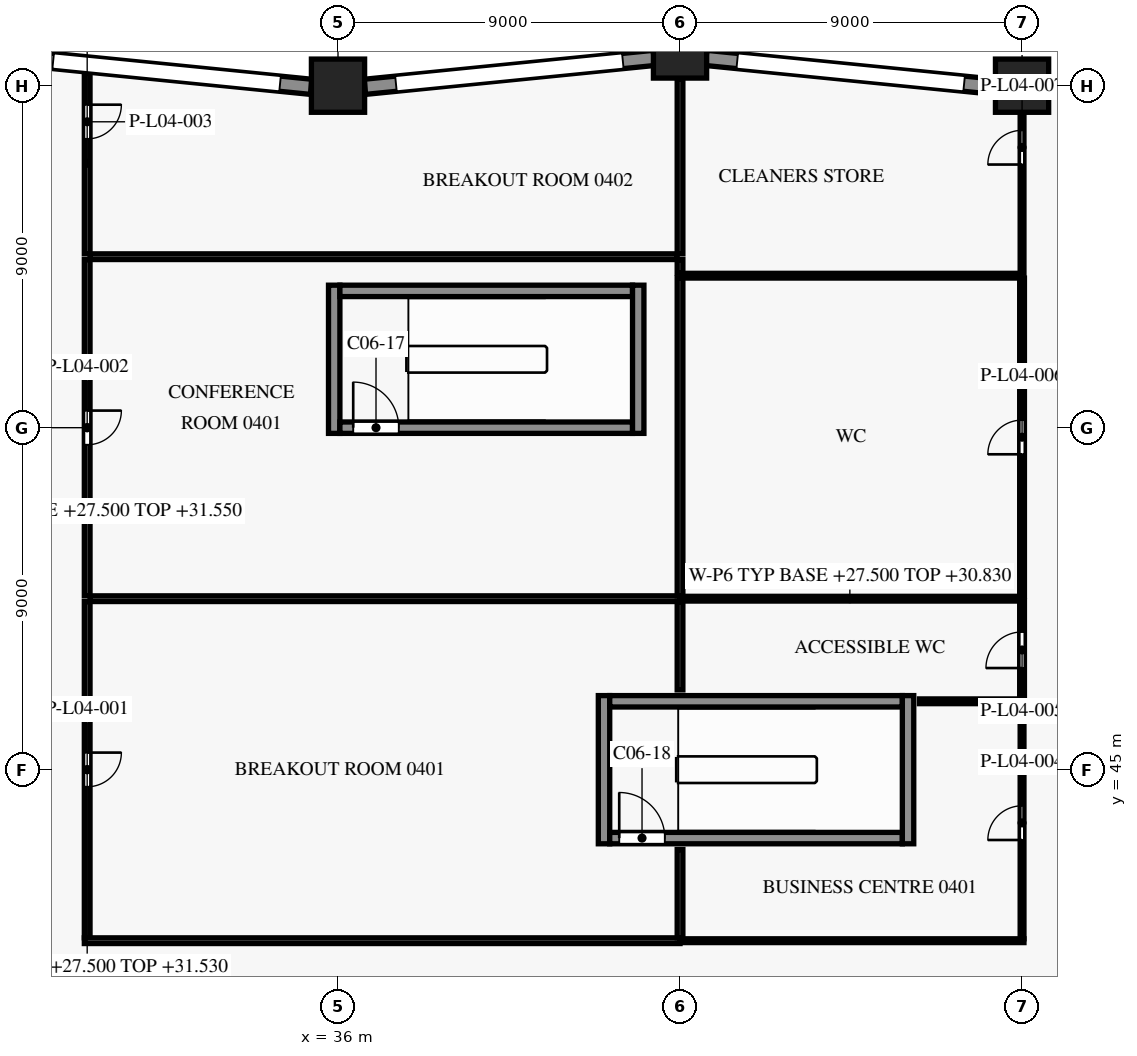
"""IFC4 building model, lengths in metres.
Left out: names, types, materials, properties, quantities, classifications, styles, units other than length and angle.
Written with IfcOpenShell. Run it as: python <this file> out.ifc"""

import sys

from ifc_helpers import new_model, si_unit, direction, frame, frame_2d, origin, origin_2d, place, context, subcontext, project, spatial, rectangle, extrude, element, fill, save


model = new_model("IFC4")
c1 = context("Model", 3, precision=1e-05, world=origin(), true_north=direction((0.0, 1.0)))
c2 = subcontext(c1, "Body", "Model", "MODEL_VIEW")
j1 = project(units=[si_unit("LENGTHUNIT", "METRE"), si_unit("PLANEANGLEUNIT", "RADIAN")], contexts=[c1])
p1 = place(None, origin())
s1 = spatial("IfcSite", under=j1, at=p1, CompositionType="ELEMENT")
p2 = place(p1, origin())
s2 = spatial("IfcBuilding", under=s1, at=p2, CompositionType="ELEMENT")
p3 = place(p2, frame((0.0, 0.0, 27.5)))
s3 = spatial("IfcBuildingStorey", under=s2, at=p3, CompositionType="ELEMENT", Elevation=27.5)
for number, where, z_axis, x_axis in (
    (1, (54.0, 63.0, 0.0), (0.0, 0.0, 1.0), (1.0, 0.0, 0.0)),
    (2, (45.0, 63.9, 0.0), (0.0, 0.0, 1.0), (1.0, 0.0, 0.0)),
    (3, (36.0, 63.0, 0.0), (0.0, 0.0, 1.0), (1.0, 0.0, 0.0)),
):
    element("IfcColumn", number, at=place(p3, frame(where, z_axis=z_axis, x_axis=x_axis)), inside=s3, PredefinedType="COLUMN", context=c2, shape_type="SweptSolid", body=[
        extrude(rectangle(XDim=1.4, YDim=1.4, at=origin_2d()), origin(), (0.0, 0.0, 1.0), 4.5),
    ])
p4 = place(p3, frame((54.707, 62.97, 0.0), z_axis=(0.0, 0.0, 1.0), x_axis=(0.995039719416, 0.099478423711, 0.0)))
e4 = element("IfcWall", 4, at=p4, inside=s3, PredefinedType="SOLIDWALL", context=c2, shape_type="SweptSolid", body=[
    extrude(rectangle(XDim=7.645, YDim=0.4, at=frame_2d((3.822, 0.0))), origin(), (0.0, 0.0, 1.0), 3.6),
])
p5 = place(p4, frame((0.823, 0.0, 0.9)))
e5 = element("IfcOpeningElement", 5, at=p5, cuts=e4, PredefinedType="OPENING", context=c2, shape_type="SweptSolid", body=[
    extrude(rectangle(XDim=6.0, YDim=1.8, at=frame_2d((3.0, 0.9))), frame((0.0, 0.21, 0.0), z_axis=(0.0, -1.0, 0.0), x_axis=(1.0, 0.0, 0.0)), (0.0, 0.0, 1.0), 0.42),
])
p6 = place(p3, frame((45.687, 63.731, 0.0), z_axis=(0.0, 0.0, 1.0), x_axis=(0.995039719416, -0.099478423711, 0.0)))
e6 = element("IfcWall", 6, at=p6, inside=s3, PredefinedType="SOLIDWALL", context=c2, shape_type="SweptSolid", body=[
    extrude(rectangle(XDim=7.645, YDim=0.4, at=frame_2d((3.822, 0.0))), origin(), (0.0, 0.0, 1.0), 3.6),
])
p7 = place(p6, frame((0.823, 0.0, 0.9)))
e7 = element("IfcOpeningElement", 7, at=p7, cuts=e6, PredefinedType="OPENING", context=c2, shape_type="SweptSolid", body=[
    extrude(rectangle(XDim=6.0, YDim=1.8, at=frame_2d((3.0, 0.9))), frame((0.0, 0.21, 0.0), z_axis=(0.0, -1.0, 0.0), x_axis=(1.0, 0.0, 0.0)), (0.0, 0.0, 1.0), 0.42),
])
p8 = place(p3, frame((36.707, 62.97, 0.0), z_axis=(0.0, 0.0, 1.0), x_axis=(0.995039719416, 0.099478423711, 0.0)))
e8 = element("IfcWall", 8, at=p8, inside=s3, PredefinedType="SOLIDWALL", context=c2, shape_type="SweptSolid", body=[
    extrude(rectangle(XDim=7.645, YDim=0.4, at=frame_2d((3.822, 0.0))), origin(), (0.0, 0.0, 1.0), 3.6),
])
p9 = place(p8, frame((0.823, 0.0, 0.9)))
e9 = element("IfcOpeningElement", 9, at=p9, cuts=e8, PredefinedType="OPENING", context=c2, shape_type="SweptSolid", body=[
    extrude(rectangle(XDim=6.0, YDim=1.8, at=frame_2d((3.0, 0.9))), frame((0.0, 0.21, 0.0), z_axis=(0.0, -1.0, 0.0), x_axis=(1.0, 0.0, 0.0)), (0.0, 0.0, 1.0), 0.42),
])
p10 = place(p3, frame((27.687, 63.731, 0.0), z_axis=(0.0, 0.0, 1.0), x_axis=(0.995039719416, -0.099478423711, 0.0)))
e10 = element("IfcWall", 10, at=p10, inside=s3, PredefinedType="SOLIDWALL", context=c2, shape_type="SweptSolid", body=[
    extrude(rectangle(XDim=7.645, YDim=0.4, at=frame_2d((3.822, 0.0))), origin(), (0.0, 0.0, 1.0), 3.6),
])
p11 = place(p10, frame((0.823, 0.0, 0.9)))
e11 = element("IfcOpeningElement", 11, at=p11, cuts=e10, PredefinedType="OPENING", context=c2, shape_type="SweptSolid", body=[
    extrude(rectangle(XDim=6.0, YDim=1.8, at=frame_2d((3.0, 0.9))), frame((0.0, 0.21, 0.0), z_axis=(0.0, -1.0, 0.0), x_axis=(1.0, 0.0, 0.0)), (0.0, 0.0, 1.0), 0.42),
])
p12 = place(p3, frame((43.15, 43.2, 0.0), z_axis=(0.0, 0.0, 1.0), x_axis=(1.0, 0.0, 0.0)))
e12 = element("IfcWall", 12, at=p12, inside=s3, PredefinedType="SHEAR", context=c2, shape_type="SweptSolid", body=[
    extrude(rectangle(XDim=7.7, YDim=0.3, at=frame_2d((3.85, 0.0))), origin(), (0.0, 0.0, 1.0), 4.2),
])
p13 = place(p12, frame((0.25, 0.0, 0.0)))
e13 = element("IfcOpeningElement", 13, at=p13, cuts=e12, PredefinedType="OPENING", context=c2, shape_type="SweptSolid", body=[
    extrude(rectangle(XDim=1.2, YDim=2.2, at=frame_2d((0.6, 1.1))), frame((0.0, 0.16, 0.0), z_axis=(0.0, -1.0, 0.0), x_axis=(1.0, 0.0, 0.0)), (0.0, 0.0, 1.0), 0.32),
])
p14 = place(p3, frame((43.15, 46.8, 0.0), z_axis=(0.0, 0.0, 1.0), x_axis=(1.0, 0.0, 0.0)))
e14 = element("IfcWall", 14, at=p14, inside=s3, PredefinedType="SHEAR", context=c2, shape_type="SweptSolid", body=[
    extrude(rectangle(XDim=7.7, YDim=0.3, at=frame_2d((3.85, 0.0))), origin(), (0.0, 0.0, 1.0), 4.2),
])
p15 = place(p3, frame((36.05, 54.0, 0.0), z_axis=(0.0, 0.0, 1.0), x_axis=(1.0, 0.0, 0.0)))
e15 = element("IfcWall", 15, at=p15, inside=s3, PredefinedType="SHEAR", context=c2, shape_type="SweptSolid", body=[
    extrude(rectangle(XDim=7.7, YDim=0.3, at=frame_2d((3.85, 0.0))), origin(), (0.0, 0.0, 1.0), 4.2),
])
p16 = place(p15, frame((0.35, 0.0, 0.0)))
e16 = element("IfcOpeningElement", 16, at=p16, cuts=e15, PredefinedType="OPENING", context=c2, shape_type="SweptSolid", body=[
    extrude(rectangle(XDim=1.2, YDim=2.2, at=frame_2d((0.6, 1.1))), frame((0.0, 0.16, 0.0), z_axis=(0.0, -1.0, 0.0), x_axis=(1.0, 0.0, 0.0)), (0.0, 0.0, 1.0), 0.32),
])
p17 = place(p3, frame((36.05, 57.6, 0.0), z_axis=(0.0, 0.0, 1.0), x_axis=(1.0, 0.0, 0.0)))
e17 = element("IfcWall", 17, at=p17, inside=s3, PredefinedType="SHEAR", context=c2, shape_type="SweptSolid", body=[
    extrude(rectangle(XDim=7.7, YDim=0.3, at=frame_2d((3.85, 0.0))), origin(), (0.0, 0.0, 1.0), 4.2),
])
for number, where, z_axis, x_axis in (
    (18, (35.9, 53.85, 0.0), (0.0, 0.0, 1.0), (0.0, 1.0, 0.0)),
    (19, (43.0, 43.05, 0.0), (0.0, 0.0, 1.0), (0.0, 1.0, 0.0)),
    (20, (43.9, 53.85, 0.0), (0.0, 0.0, 1.0), (0.0, 1.0, 0.0)),
    (21, (51.0, 43.05, 0.0), (0.0, 0.0, 1.0), (0.0, 1.0, 0.0)),
):
    element("IfcWall", number, at=place(p3, frame(where, z_axis=z_axis, x_axis=x_axis)), inside=s3, PredefinedType="SHEAR", context=c2, shape_type="SweptSolid", body=[
        extrude(rectangle(XDim=3.9, YDim=0.3, at=frame_2d((1.95, 0.0))), origin(), (0.0, 0.0, 1.0), 4.2),
    ])
p18 = place(p3, frame((29.325, 40.5, 0.0), z_axis=(0.0, 0.0, 1.0), x_axis=(1.0, 0.0, 0.0)))
e22 = element("IfcWall", 22, at=p18, inside=s3, PredefinedType="PARTITIONING", context=c2, shape_type="SweptSolid", body=[
    extrude(rectangle(XDim=15.675, YDim=0.15, at=frame_2d((7.837, 0.0))), origin(), (0.0, 0.0, 1.0), 3.33),
])
p19 = place(p3, frame((45.0, 40.5, 0.0), z_axis=(0.0, 0.0, 1.0), x_axis=(1.0, 0.0, 0.0)))
e23 = element("IfcWall", 23, at=p19, inside=s3, PredefinedType="PARTITIONING", context=c2, shape_type="SweptSolid", body=[
    extrude(rectangle(XDim=9.05, YDim=0.1, at=frame_2d((4.525, 0.0))), origin(), (0.0, 0.0, 1.0), 3.33),
])
p20 = place(p3, frame((54.0, 40.55, 0.0), z_axis=(0.0, 0.0, 1.0), x_axis=(0.0, 1.0, 0.0)))
e24 = element("IfcWall", 24, at=p20, inside=s3, PredefinedType="PARTITIONING", context=c2, shape_type="SweptSolid", body=[
    extrude(rectangle(XDim=6.188, YDim=0.1, at=frame_2d((3.094, 0.0))), origin(), (0.0, 0.0, 1.0), 3.33),
])
p21 = place(p20, frame((2.6, 0.0, 0.0)))
e25 = element("IfcOpeningElement", 25, at=p21, cuts=e24, PredefinedType="OPENING", context=c2, shape_type="SweptSolid", body=[
    extrude(rectangle(XDim=0.9, YDim=2.1, at=frame_2d((0.45, 1.05))), frame((0.0, 0.06, 0.0), z_axis=(0.0, -1.0, 0.0), x_axis=(1.0, 0.0, 0.0)), (0.0, 0.0, 1.0), 0.12),
])
p22 = place(p3, frame((45.0, 42.9, 0.0), z_axis=(0.0, 0.0, 1.0), x_axis=(0.0, -1.0, 0.0)))
e26 = element("IfcWall", 26, at=p22, inside=s3, PredefinedType="PARTITIONING", context=c2, shape_type="SweptSolid", body=[
    extrude(rectangle(XDim=2.325, YDim=0.15, at=frame_2d((1.163, 0.0))), origin(), (0.0, 0.0, 1.0), 3.33),
])
p23 = place(p3, frame((51.3, 46.8, 0.0), z_axis=(0.0, 0.0, 1.0), x_axis=(1.0, 0.0, 0.0)))
e27 = element("IfcWall", 27, at=p23, inside=s3, PredefinedType="PARTITIONING", context=c2, shape_type="SweptSolid", body=[
    extrude(rectangle(XDim=2.637, YDim=0.125, at=frame_2d((1.319, 0.0))), origin(), (0.0, 0.0, 1.0), 3.33),
])
p24 = place(p3, frame((54.0, 46.863, 0.0), z_axis=(0.0, 0.0, 1.0), x_axis=(0.0, 1.0, 0.0)))
e28 = element("IfcWall", 28, at=p24, inside=s3, PredefinedType="PARTITIONING", context=c2, shape_type="SweptSolid", body=[
    extrude(rectangle(XDim=2.575, YDim=0.125, at=frame_2d((1.288, 0.0))), origin(), (0.0, 0.0, 1.0), 3.33),
])
p25 = place(p24, frame((0.812, 0.0, 0.0)))
e29 = element("IfcOpeningElement", 29, at=p25, cuts=e28, PredefinedType="OPENING", context=c2, shape_type="SweptSolid", body=[
    extrude(rectangle(XDim=0.95, YDim=2.1, at=frame_2d((0.475, 1.05))), frame((0.0, 0.073, 0.0), z_axis=(0.0, -1.0, 0.0), x_axis=(1.0, 0.0, 0.0)), (0.0, 0.0, 1.0), 0.145),
])
p26 = place(p3, frame((29.4, 49.425, 0.0), z_axis=(0.0, 0.0, 1.0), x_axis=(0.0, -1.0, 0.0)))
e30 = element("IfcWall", 30, at=p26, inside=s3, PredefinedType="PARTITIONING", context=c2, shape_type="SweptSolid", body=[
    extrude(rectangle(XDim=8.85, YDim=0.15, at=frame_2d((4.425, 0.0))), origin(), (0.0, 0.0, 1.0), 4.03),
])
p27 = place(p26, frame((3.975, 0.0, 0.0)))
e31 = element("IfcOpeningElement", 31, at=p27, cuts=e30, PredefinedType="OPENING", context=c2, shape_type="SweptSolid", body=[
    extrude(rectangle(XDim=0.9, YDim=2.1, at=frame_2d((0.45, 1.05))), frame((0.0, 0.085, 0.0), z_axis=(0.0, -1.0, 0.0), x_axis=(1.0, 0.0, 0.0)), (0.0, 0.0, 1.0), 0.17),
])
p28 = place(p3, frame((45.0, 49.425, 0.0), z_axis=(0.0, 0.0, 1.0), x_axis=(0.0, -1.0, 0.0)))
e32 = element("IfcWall", 32, at=p28, inside=s3, PredefinedType="PARTITIONING", context=c2, shape_type="SweptSolid", body=[
    extrude(rectangle(XDim=2.325, YDim=0.15, at=frame_2d((1.163, 0.0))), origin(), (0.0, 0.0, 1.0), 3.33),
])
p29 = place(p3, frame((29.475, 49.5, 0.0), z_axis=(0.0, 0.0, 1.0), x_axis=(1.0, 0.0, 0.0)))
e33 = element("IfcWall", 33, at=p29, inside=s3, PredefinedType="PARTITIONING", context=c2, shape_type="SweptSolid", body=[
    extrude(rectangle(XDim=15.525, YDim=0.15, at=frame_2d((7.762, 0.0))), origin(), (0.0, 0.0, 1.0), 3.33),
])
p30 = place(p3, frame((45.0, 49.5, 0.0), z_axis=(0.0, 0.0, 1.0), x_axis=(1.0, 0.0, 0.0)))
e34 = element("IfcWall", 34, at=p30, inside=s3, PredefinedType="PARTITIONING", context=c2, shape_type="SweptSolid", body=[
    extrude(rectangle(XDim=8.938, YDim=0.125, at=frame_2d((4.469, 0.0))), origin(), (0.0, 0.0, 1.0), 3.33),
])
p31 = place(p3, frame((54.0, 49.562, 0.0), z_axis=(0.0, 0.0, 1.0), x_axis=(0.0, 1.0, 0.0)))
e35 = element("IfcWall", 35, at=p31, inside=s3, PredefinedType="PARTITIONING", context=c2, shape_type="SweptSolid", body=[
    extrude(rectangle(XDim=8.375, YDim=0.125, at=frame_2d((4.188, 0.0))), origin(), (0.0, 0.0, 1.0), 3.33),
])
p32 = place(p31, frame((3.738, 0.0, 0.0)))
e36 = element("IfcOpeningElement", 36, at=p32, cuts=e35, PredefinedType="OPENING", context=c2, shape_type="SweptSolid", body=[
    extrude(rectangle(XDim=0.9, YDim=2.1, at=frame_2d((0.45, 1.05))), frame((0.0, 0.073, 0.0), z_axis=(0.0, -1.0, 0.0), x_axis=(1.0, 0.0, 0.0)), (0.0, 0.0, 1.0), 0.145),
])
p33 = place(p3, frame((45.0, 57.938, 0.0), z_axis=(0.0, 0.0, 1.0), x_axis=(0.0, -1.0, 0.0)))
e37 = element("IfcWall", 37, at=p33, inside=s3, PredefinedType="PARTITIONING", context=c2, shape_type="SweptSolid", body=[
    extrude(rectangle(XDim=8.363, YDim=0.15, at=frame_2d((4.181, 0.0))), origin(), (0.0, 0.0, 1.0), 3.33),
])
p34 = place(p3, frame((45.075, 58.0, 0.0), z_axis=(0.0, 0.0, 1.0), x_axis=(1.0, 0.0, 0.0)))
e38 = element("IfcWall", 38, at=p34, inside=s3, PredefinedType="PARTITIONING", context=c2, shape_type="SweptSolid", body=[
    extrude(rectangle(XDim=8.863, YDim=0.125, at=frame_2d((4.431, 0.0))), origin(), (0.0, 0.0, 1.0), 3.33),
])
p35 = place(p3, frame((54.0, 58.062, 0.0), z_axis=(0.0, 0.0, 1.0), x_axis=(0.0, 1.0, 0.0)))
e39 = element("IfcWall", 39, at=p35, inside=s3, PredefinedType="PARTITIONING", context=c2, shape_type="SweptSolid", body=[
    extrude(rectangle(XDim=4.218, YDim=0.1, at=frame_2d((2.109, 0.0))), origin(), (0.0, 0.0, 1.0), 3.33),
])
p36 = place(p35, frame((2.863, 0.0, 0.0)))
e40 = element("IfcOpeningElement", 40, at=p36, cuts=e39, PredefinedType="OPENING", context=c2, shape_type="SweptSolid", body=[
    extrude(rectangle(XDim=0.9, YDim=2.1, at=frame_2d((0.45, 1.05))), frame((0.0, 0.06, 0.0), z_axis=(0.0, -1.0, 0.0), x_axis=(1.0, 0.0, 0.0)), (0.0, 0.0, 1.0), 0.12),
])
p37 = place(p3, frame((29.4, 58.425, 0.0), z_axis=(0.0, 0.0, 1.0), x_axis=(0.0, -1.0, 0.0)))
e41 = element("IfcWall", 41, at=p37, inside=s3, PredefinedType="PARTITIONING", context=c2, shape_type="SweptSolid", body=[
    extrude(rectangle(XDim=8.85, YDim=0.15, at=frame_2d((4.425, 0.0))), origin(), (0.0, 0.0, 1.0), 4.03),
])
p38 = place(p37, frame((3.975, 0.0, 0.0)))
e42 = element("IfcOpeningElement", 42, at=p38, cuts=e41, PredefinedType="OPENING", context=c2, shape_type="SweptSolid", body=[
    extrude(rectangle(XDim=0.9, YDim=2.1, at=frame_2d((0.45, 1.05))), frame((0.0, 0.085, 0.0), z_axis=(0.0, -1.0, 0.0), x_axis=(1.0, 0.0, 0.0)), (0.0, 0.0, 1.0), 0.17),
])
p39 = place(p3, frame((45.0, 58.425, 0.0), z_axis=(0.0, 0.0, 1.0), x_axis=(0.0, -1.0, 0.0)))
e43 = element("IfcWall", 43, at=p39, inside=s3, PredefinedType="PARTITIONING", context=c2, shape_type="SweptSolid", body=[
    extrude(rectangle(XDim=0.363, YDim=0.15, at=frame_2d((0.181, 0.0))), origin(), (0.0, 0.0, 1.0), 3.33),
])
p40 = place(p3, frame((29.475, 58.5, 0.0), z_axis=(0.0, 0.0, 1.0), x_axis=(1.0, 0.0, 0.0)))
e44 = element("IfcWall", 44, at=p40, inside=s3, PredefinedType="PARTITIONING", context=c2, shape_type="SweptSolid", body=[
    extrude(rectangle(XDim=15.45, YDim=0.15, at=frame_2d((7.725, 0.0))), origin(), (0.0, 0.0, 1.0), 3.33),
])
p41 = place(p3, frame((29.4, 63.338, 0.0), z_axis=(0.0, 0.0, 1.0), x_axis=(0.0, -1.0, 0.0)))
e45 = element("IfcWall", 45, at=p41, inside=s3, PredefinedType="PARTITIONING", context=c2, shape_type="SweptSolid", body=[
    extrude(rectangle(XDim=4.763, YDim=0.15, at=frame_2d((2.382, 0.0))), origin(), (0.0, 0.0, 1.0), 4.03),
])
p42 = place(p41, frame((0.838, 0.0, 0.0)))
e46 = element("IfcOpeningElement", 46, at=p42, cuts=e45, PredefinedType="OPENING", context=c2, shape_type="SweptSolid", body=[
    extrude(rectangle(XDim=0.9, YDim=2.1, at=frame_2d((0.45, 1.05))), frame((0.0, 0.085, 0.0), z_axis=(0.0, -1.0, 0.0), x_axis=(1.0, 0.0, 0.0)), (0.0, 0.0, 1.0), 0.17),
])
p43 = place(p3, frame((45.0, 63.18, 0.0), z_axis=(0.0, 0.0, 1.0), x_axis=(0.0, -1.0, 0.0)))
e47 = element("IfcWall", 47, at=p43, inside=s3, PredefinedType="PARTITIONING", context=c2, shape_type="SweptSolid", body=[
    extrude(rectangle(XDim=4.605, YDim=0.15, at=frame_2d((2.302, 0.0))), origin(), (0.0, 0.0, 1.0), 3.33),
])
p44 = place(p7, origin())
e48 = element("IfcWindow", 48, at=p44, inside=s3, PartitioningType="SINGLE_PANEL", PredefinedType="WINDOW", context=c2, shape_type="SweptSolid", body=[
    extrude(rectangle(XDim=6.0, YDim=1.8, at=frame_2d((3.0, 0.9))), frame((0.0, 0.03, 0.0), z_axis=(0.0, -1.0, 0.0), x_axis=(1.0, 0.0, 0.0)), (0.0, 0.0, 1.0), 0.06),
])
fill(e7, e48)
p45 = place(p9, origin())
e49 = element("IfcWindow", 49, at=p45, inside=s3, PartitioningType="SINGLE_PANEL", PredefinedType="WINDOW", context=c2, shape_type="SweptSolid", body=[
    extrude(rectangle(XDim=6.0, YDim=1.8, at=frame_2d((3.0, 0.9))), frame((0.0, 0.03, 0.0), z_axis=(0.0, -1.0, 0.0), x_axis=(1.0, 0.0, 0.0)), (0.0, 0.0, 1.0), 0.06),
])
fill(e9, e49)
p46 = place(p11, origin())
e50 = element("IfcWindow", 50, at=p46, inside=s3, PartitioningType="SINGLE_PANEL", PredefinedType="WINDOW", context=c2, shape_type="SweptSolid", body=[
    extrude(rectangle(XDim=6.0, YDim=1.8, at=frame_2d((3.0, 0.9))), frame((0.0, 0.03, 0.0), z_axis=(0.0, -1.0, 0.0), x_axis=(1.0, 0.0, 0.0)), (0.0, 0.0, 1.0), 0.06),
])
fill(e11, e50)
p47 = place(p16, origin())
e51 = element("IfcDoor", 51, at=p47, inside=s3, OperationType="SINGLE_SWING_LEFT", PredefinedType="DOOR", context=c2, shape_type="SweptSolid", body=[
    extrude(rectangle(XDim=1.2, YDim=2.2, at=frame_2d((0.6, 1.1))), frame((0.0, 0.025, 0.0), z_axis=(0.0, -1.0, 0.0), x_axis=(1.0, 0.0, 0.0)), (0.0, 0.0, 1.0), 0.05),
])
fill(e16, e51)
p48 = place(p13, origin())
e52 = element("IfcDoor", 52, at=p48, inside=s3, OperationType="SINGLE_SWING_RIGHT", PredefinedType="DOOR", context=c2, shape_type="SweptSolid", body=[
    extrude(rectangle(XDim=1.2, YDim=2.2, at=frame_2d((0.6, 1.1))), frame((0.0, 0.025, 0.0), z_axis=(0.0, -1.0, 0.0), x_axis=(1.0, 0.0, 0.0)), (0.0, 0.0, 1.0), 0.05),
])
fill(e13, e52)
p49 = place(p27, origin())
e53 = element("IfcDoor", 53, at=p49, inside=s3, OperationType="SINGLE_SWING_LEFT", PredefinedType="DOOR", context=c2, shape_type="SweptSolid", body=[
    extrude(rectangle(XDim=0.9, YDim=2.1, at=frame_2d((0.45, 1.05))), frame((0.0, 0.025, 0.0), z_axis=(0.0, -1.0, 0.0), x_axis=(1.0, 0.0, 0.0)), (0.0, 0.0, 1.0), 0.05),
])
fill(e31, e53)
p50 = place(p38, origin())
e54 = element("IfcDoor", 54, at=p50, inside=s3, OperationType="SINGLE_SWING_LEFT", PredefinedType="DOOR", context=c2, shape_type="SweptSolid", body=[
    extrude(rectangle(XDim=0.9, YDim=2.1, at=frame_2d((0.45, 1.05))), frame((0.0, 0.025, 0.0), z_axis=(0.0, -1.0, 0.0), x_axis=(1.0, 0.0, 0.0)), (0.0, 0.0, 1.0), 0.05),
])
fill(e42, e54)
p51 = place(p42, origin())
e55 = element("IfcDoor", 55, at=p51, inside=s3, OperationType="SINGLE_SWING_RIGHT", PredefinedType="DOOR", context=c2, shape_type="SweptSolid", body=[
    extrude(rectangle(XDim=0.9, YDim=2.1, at=frame_2d((0.45, 1.05))), frame((0.0, 0.025, 0.0), z_axis=(0.0, -1.0, 0.0), x_axis=(1.0, 0.0, 0.0)), (0.0, 0.0, 1.0), 0.05),
])
fill(e46, e55)
p52 = place(p21, origin())
e56 = element("IfcDoor", 56, at=p52, inside=s3, OperationType="SINGLE_SWING_RIGHT", PredefinedType="DOOR", context=c2, shape_type="SweptSolid", body=[
    extrude(rectangle(XDim=0.9, YDim=2.1, at=frame_2d((0.45, 1.05))), frame((0.0, 0.025, 0.0), z_axis=(0.0, -1.0, 0.0), x_axis=(1.0, 0.0, 0.0)), (0.0, 0.0, 1.0), 0.05),
])
fill(e25, e56)
p53 = place(p25, origin())
e57 = element("IfcDoor", 57, at=p53, inside=s3, OperationType="SINGLE_SWING_RIGHT", PredefinedType="DOOR", context=c2, shape_type="SweptSolid", body=[
    extrude(rectangle(XDim=0.95, YDim=2.1, at=frame_2d((0.475, 1.05))), frame((0.0, 0.025, 0.0), z_axis=(0.0, -1.0, 0.0), x_axis=(1.0, 0.0, 0.0)), (0.0, 0.0, 1.0), 0.05),
])
fill(e29, e57)
p54 = place(p32, origin())
e58 = element("IfcDoor", 58, at=p54, inside=s3, OperationType="SINGLE_SWING_RIGHT", PredefinedType="DOOR", context=c2, shape_type="SweptSolid", body=[
    extrude(rectangle(XDim=0.9, YDim=2.1, at=frame_2d((0.45, 1.05))), frame((0.0, 0.025, 0.0), z_axis=(0.0, -1.0, 0.0), x_axis=(1.0, 0.0, 0.0)), (0.0, 0.0, 1.0), 0.05),
])
fill(e36, e58)
p55 = place(p36, origin())
e59 = element("IfcDoor", 59, at=p55, inside=s3, OperationType="SINGLE_SWING_RIGHT", PredefinedType="DOOR", context=c2, shape_type="SweptSolid", body=[
    extrude(rectangle(XDim=0.9, YDim=2.1, at=frame_2d((0.45, 1.05))), frame((0.0, 0.025, 0.0), z_axis=(0.0, -1.0, 0.0), x_axis=(1.0, 0.0, 0.0)), (0.0, 0.0, 1.0), 0.05),
])
fill(e40, e59)
save(model, sys.argv[1])
